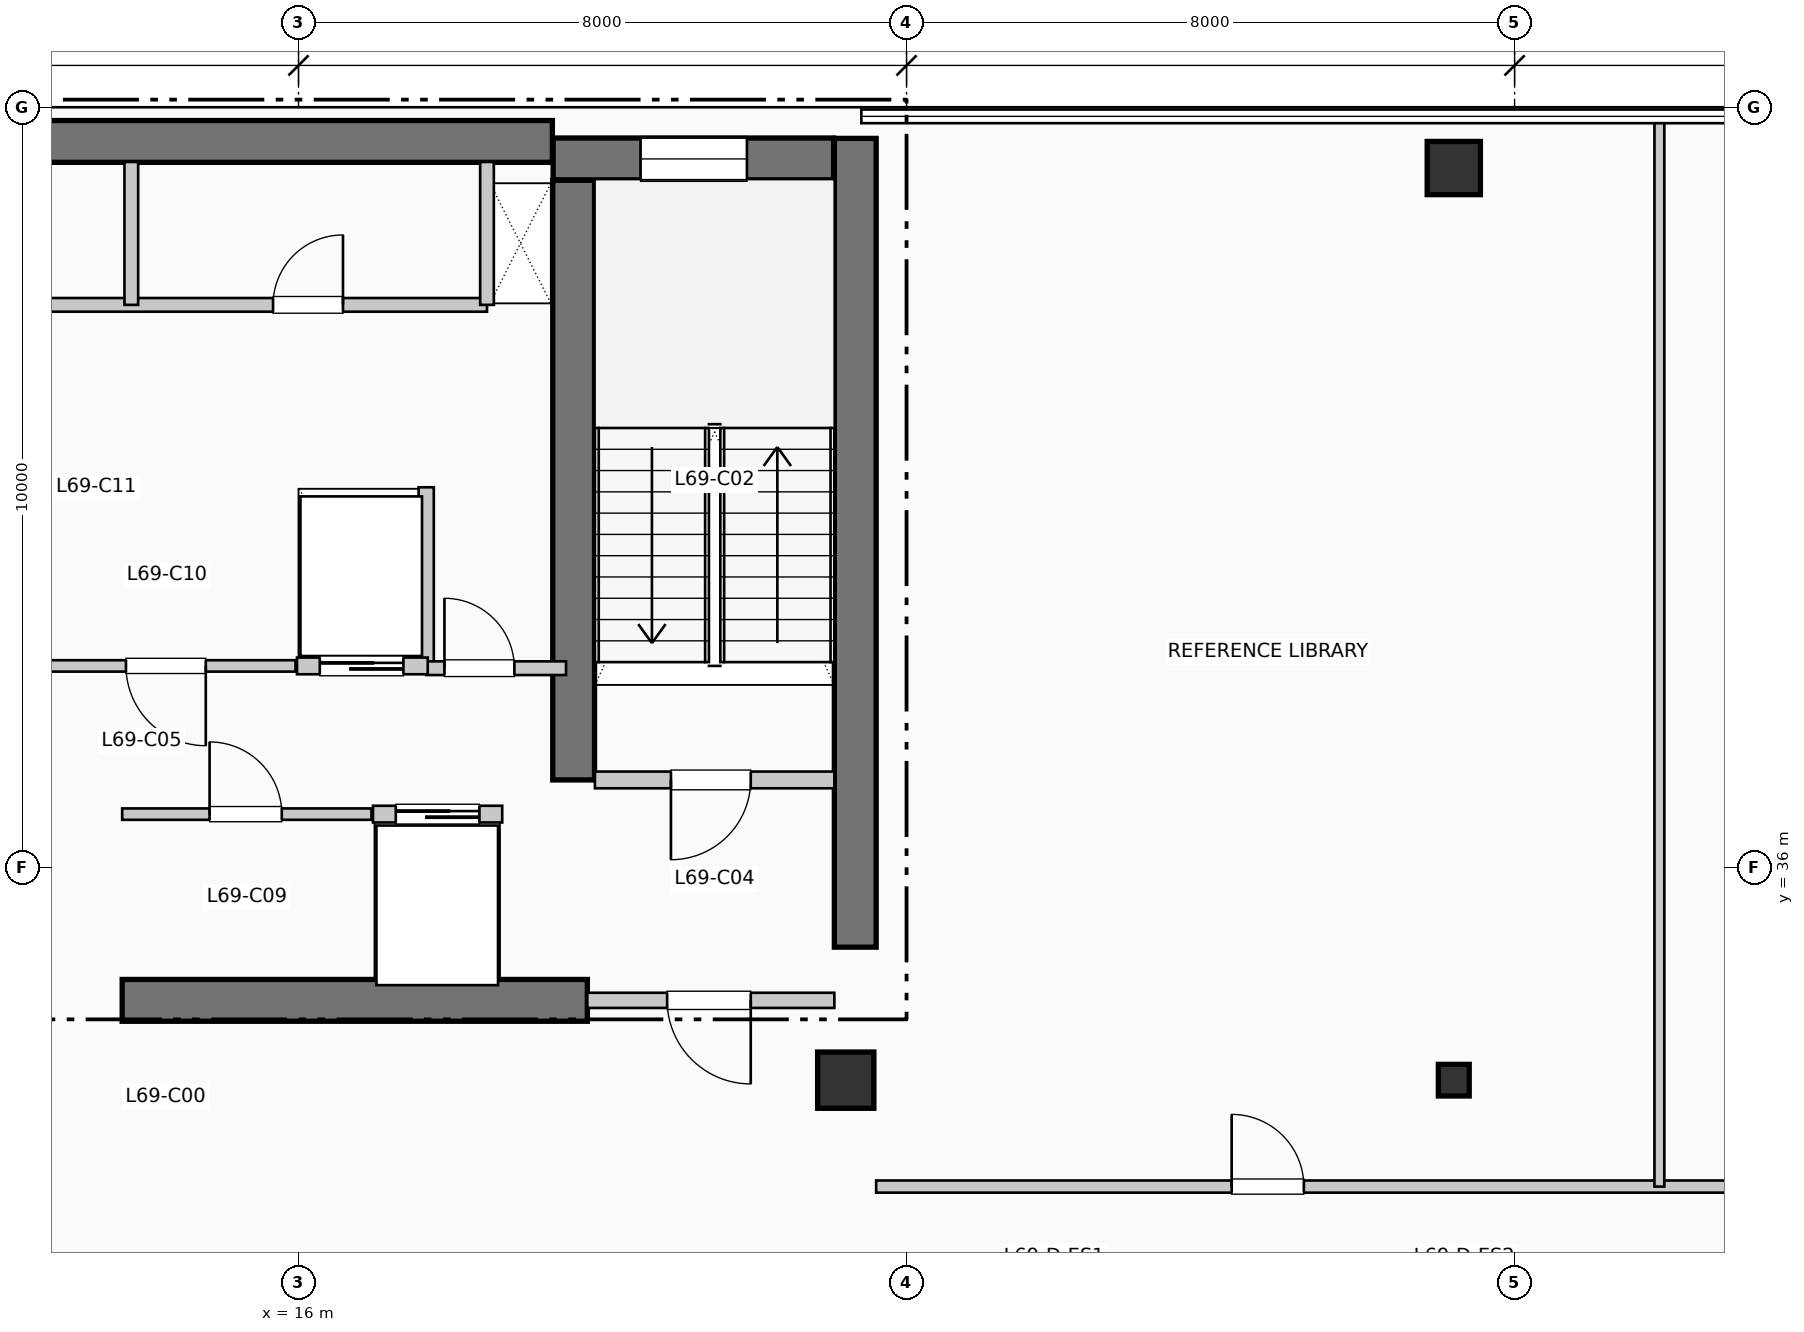
"""IFC4 building model, lengths in metres.
Left out: names, types, materials, properties, quantities, classifications, styles, units other than length and angle.
Written with IfcOpenShell. Run it as: python <this file> out.ifc"""

import sys

from ifc_helpers import new_model, si_unit, direction, frame, frame_2d, origin, origin_2d, place, context, subcontext, project, spatial, rectangle, i_section, extrude, element, fill, save


model = new_model("IFC4")
c1 = context("Model", 3, precision=1e-05, world=origin(), true_north=direction((0.0, 1.0)))
c2 = subcontext(c1, "Body", "Model", "MODEL_VIEW")
j1 = project(units=[si_unit("LENGTHUNIT", "METRE"), si_unit("PLANEANGLEUNIT", "RADIAN")], contexts=[c1])
p1 = place(None, origin())
s1 = spatial("IfcSite", under=j1, at=p1, CompositionType="ELEMENT")
p2 = place(p1, origin())
s2 = spatial("IfcBuilding", under=s1, at=p2, CompositionType="ELEMENT")
p3 = place(p2, frame((0.0, 0.0, 284.13)))
s3 = spatial("IfcBuildingStorey", under=s2, at=p3, CompositionType="ELEMENT", Elevation=284.13)
p4 = place(p3, frame((5.36, 45.55, 0.0), z_axis=(0.0, 0.0, 1.0), x_axis=(1.0, 0.0, 0.0)))
e1 = element("IfcWall", 1, at=p4, inside=s3, PredefinedType="SHEAR", context=c2, shape_type="SweptSolid", body=[
    extrude(rectangle(XDim=13.98, YDim=0.55, at=frame_2d((6.99, 0.0))), origin(), (0.0, 0.0, 1.0), 3.96),
])
p5 = place(p3, frame((23.325, 34.95, 0.0), z_axis=(0.0, 0.0, 1.0), x_axis=(0.0, 1.0, 0.0)))
e2 = element("IfcWall", 2, at=p5, inside=s3, PredefinedType="SHEAR", context=c2, shape_type="SweptSolid", body=[
    extrude(rectangle(XDim=10.64, YDim=0.55, at=frame_2d((5.32, 0.0))), origin(), (0.0, 0.0, 1.0), 3.96),
])
p6 = place(p3, frame((13.68, 34.25, 0.0), z_axis=(0.0, 0.0, 1.0), x_axis=(1.0, 0.0, 0.0)))
e3 = element("IfcWall", 3, at=p6, inside=s3, PredefinedType="SHEAR", context=c2, shape_type="SweptSolid", body=[
    extrude(rectangle(XDim=6.12, YDim=0.55, at=frame_2d((3.06, 0.0))), origin(), (0.0, 0.0, 1.0), 3.96),
])
p7 = place(p3, frame((19.62, 37.15, 0.0), z_axis=(0.0, 0.0, 1.0), x_axis=(0.0, 1.0, 0.0)))
e4 = element("IfcWall", 4, at=p7, inside=s3, PredefinedType="SHEAR", context=c2, shape_type="SweptSolid", body=[
    extrude(rectangle(XDim=7.89, YDim=0.55, at=frame_2d((3.945, 0.0))), origin(), (0.0, 0.0, 1.0), 3.96),
])
p8 = place(p3, frame((19.35, 45.32, 0.0), z_axis=(0.0, 0.0, 1.0), x_axis=(1.0, 0.0, 0.0)))
e5 = element("IfcWall", 5, at=p8, inside=s3, PredefinedType="SHEAR", context=c2, shape_type="SweptSolid", body=[
    extrude(rectangle(XDim=3.69, YDim=0.55, at=frame_2d((1.845, 0.0))), origin(), (0.0, 0.0, 1.0), 3.96),
])
p9 = place(p8, frame((1.15, 0.0, 1.05)))
e6 = element("IfcOpeningElement", 6, at=p9, cuts=e5, PredefinedType="OPENING", context=c2, shape_type="SweptSolid", body=[
    extrude(rectangle(XDim=1.4, YDim=1.8, at=frame_2d((0.7, 0.9))), frame((0.0, 0.285, 0.0), z_axis=(0.0, -1.0, 0.0), x_axis=(1.0, 0.0, 0.0)), (0.0, 0.0, 1.0), 0.57),
])
p10 = place(p3, frame((23.2, 33.2, 0.0), z_axis=(0.0, 0.0, 1.0), x_axis=(1.0, 0.0, 0.0)))
e7 = element("IfcColumn", 7, at=p10, inside=s3, PredefinedType="COLUMN", context=c2, shape_type="SweptSolid", body=[
    extrude(rectangle(XDim=0.74, YDim=0.74, at=origin_2d()), origin(), (0.0, 0.0, 1.0), 3.96),
])
p11 = place(p3, frame((31.2, 33.2, 0.0), z_axis=(0.0, 0.0, 1.0), x_axis=(1.0, 0.0, 0.0)))
e8 = element("IfcColumn", 8, at=p11, inside=s3, PredefinedType="COLUMN", context=c2, shape_type="SweptSolid", body=[
    extrude(i_section(OverallWidth=0.406, OverallDepth=0.416, WebThickness=0.022, FlangeThickness=0.036, at=origin_2d()), origin(), (0.0, 0.0, 1.0), 3.96),
])
p12 = place(p3, frame((31.2, 45.2, 0.0), z_axis=(0.0, 0.0, 1.0), x_axis=(1.0, 0.0, 0.0)))
e9 = element("IfcColumn", 9, at=p12, inside=s3, PredefinedType="COLUMN", context=c2, shape_type="SweptSolid", body=[
    extrude(rectangle(XDim=0.7, YDim=0.7, at=origin_2d()), origin(), (0.0, 0.0, 1.0), 3.96),
])
p13 = place(p3, frame((19.9, 37.15, 0.0), z_axis=(0.0, 0.0, 1.0), x_axis=(1.0, 0.0, 0.0)))
e10 = element("IfcWall", 10, at=p13, inside=s3, PredefinedType="PARTITIONING", context=c2, shape_type="SweptSolid", body=[
    extrude(rectangle(XDim=3.15, YDim=0.22, at=frame_2d((1.575, 0.0))), origin(), (0.0, 0.0, 1.0), 3.74),
])
p14 = place(p13, frame((2.05, 0.0, 0.0), z_axis=(0.0, 0.0, 1.0), x_axis=(-1.0, 0.0, 0.0)))
e11 = element("IfcOpeningElement", 11, at=p14, cuts=e10, PredefinedType="OPENING", context=c2, shape_type="SweptSolid", body=[
    extrude(rectangle(XDim=1.05, YDim=2.15, at=frame_2d((0.525, 1.075))), frame((0.0, 0.12, 0.0), z_axis=(0.0, -1.0, 0.0), x_axis=(1.0, 0.0, 0.0)), (0.0, 0.0, 1.0), 0.24),
])
p15 = place(p3, frame((19.8, 34.25, 0.0), z_axis=(0.0, 0.0, 1.0), x_axis=(1.0, 0.0, 0.0)))
e12 = element("IfcWall", 12, at=p15, inside=s3, PredefinedType="PARTITIONING", context=c2, shape_type="SweptSolid", body=[
    extrude(rectangle(XDim=3.25, YDim=0.2, at=frame_2d((1.625, 0.0))), origin(), (0.0, 0.0, 1.0), 3.74),
])
p16 = place(p15, frame((2.15, 0.0, 0.0), z_axis=(0.0, 0.0, 1.0), x_axis=(-1.0, 0.0, 0.0)))
e13 = element("IfcOpeningElement", 13, at=p16, cuts=e12, PredefinedType="OPENING", context=c2, shape_type="SweptSolid", body=[
    extrude(rectangle(XDim=1.1, YDim=2.15, at=frame_2d((0.55, 1.075))), frame((0.0, 0.11, 0.0), z_axis=(0.0, -1.0, 0.0), x_axis=(1.0, 0.0, 0.0)), (0.0, 0.0, 1.0), 0.22),
])
p17 = place(p3, frame((17.68, 38.65, 0.0), z_axis=(0.0, 0.0, 1.0), x_axis=(0.0, 1.0, 0.0)))
e14 = element("IfcWall", 14, at=p17, inside=s3, PredefinedType="PARTITIONING", context=c2, shape_type="SweptSolid", body=[
    extrude(rectangle(XDim=2.35, YDim=0.2, at=frame_2d((1.175, 0.0))), origin(), (0.0, 0.0, 1.0), 3.74),
])
p18 = place(p3, frame((17.68, 38.62, 0.0), z_axis=(0.0, 0.0, 1.0), x_axis=(1.0, 0.0, 0.0)))
e15 = element("IfcWall", 15, at=p18, inside=s3, PredefinedType="PARTITIONING", context=c2, shape_type="SweptSolid", body=[
    extrude(rectangle(XDim=1.84, YDim=0.18, at=frame_2d((0.92, 0.0))), origin(), (0.0, 0.0, 1.0), 3.74),
])
p19 = place(p18, frame((0.24, 0.0, 0.0)))
e16 = element("IfcOpeningElement", 16, at=p19, cuts=e15, PredefinedType="OPENING", context=c2, shape_type="SweptSolid", body=[
    extrude(rectangle(XDim=0.92, YDim=2.1, at=frame_2d((0.46, 1.05))), frame((0.0, 0.1, 0.0), z_axis=(0.0, -1.0, 0.0), x_axis=(1.0, 0.0, 0.0)), (0.0, 0.0, 1.0), 0.2),
])
p20 = place(p3, frame((13.68, 36.7, 0.0), z_axis=(0.0, 0.0, 1.0), x_axis=(1.0, 0.0, 0.0)))
e17 = element("IfcWall", 17, at=p20, inside=s3, PredefinedType="PARTITIONING", context=c2, shape_type="SweptSolid", body=[
    extrude(rectangle(XDim=3.28, YDim=0.15, at=frame_2d((1.64, 0.0))), origin(), (0.0, 0.0, 1.0), 3.74),
])
p21 = place(p20, frame((1.15, 0.0, 0.0)))
e18 = element("IfcOpeningElement", 18, at=p21, cuts=e17, PredefinedType="OPENING", context=c2, shape_type="SweptSolid", body=[
    extrude(rectangle(XDim=0.95, YDim=2.15, at=frame_2d((0.475, 1.075))), frame((0.0, 0.085, 0.0), z_axis=(0.0, -1.0, 0.0), x_axis=(1.0, 0.0, 0.0)), (0.0, 0.0, 1.0), 0.17),
])
p22 = place(p3, frame((12.58, 38.65, 0.0), z_axis=(0.0, 0.0, 1.0), x_axis=(1.0, 0.0, 0.0)))
e19 = element("IfcWall", 19, at=p22, inside=s3, PredefinedType="PARTITIONING", context=c2, shape_type="SweptSolid", body=[
    extrude(rectangle(XDim=3.38, YDim=0.15, at=frame_2d((1.69, 0.0))), origin(), (0.0, 0.0, 1.0), 3.74),
])
p23 = place(p22, frame((2.2, 0.0, 0.0), z_axis=(0.0, 0.0, 1.0), x_axis=(-1.0, 0.0, 0.0)))
e20 = element("IfcOpeningElement", 20, at=p23, cuts=e19, PredefinedType="OPENING", context=c2, shape_type="SweptSolid", body=[
    extrude(rectangle(XDim=1.05, YDim=2.15, at=frame_2d((0.525, 1.075))), frame((0.0, 0.085, 0.0), z_axis=(0.0, -1.0, 0.0), x_axis=(1.0, 0.0, 0.0)), (0.0, 0.0, 1.0), 0.17),
])
p24 = place(p3, frame((16.98, 36.7, 0.0), z_axis=(0.0, 0.0, 1.0), x_axis=(1.0, 0.0, 0.0)))
e21 = element("IfcWall", 21, at=p24, inside=s3, PredefinedType="PARTITIONING", context=c2, shape_type="SweptSolid", body=[
    extrude(rectangle(XDim=1.7, YDim=0.22, at=frame_2d((0.85, 0.0))), origin(), (0.0, 0.0, 1.0), 3.74),
])
p25 = place(p24, frame((0.3, 0.0, 0.0)))
e22 = element("IfcOpeningElement", 22, at=p25, cuts=e21, PredefinedType="OPENING", context=c2, shape_type="SweptSolid", body=[
    extrude(rectangle(XDim=1.1, YDim=2.2, at=frame_2d((0.55, 1.1))), frame((0.0, 0.12, 0.0), z_axis=(0.0, -1.0, 0.0), x_axis=(1.0, 0.0, 0.0)), (0.0, 0.0, 1.0), 0.24),
])
p26 = place(p3, frame((15.98, 38.65, 0.0), z_axis=(0.0, 0.0, 1.0), x_axis=(1.0, 0.0, 0.0)))
e23 = element("IfcWall", 23, at=p26, inside=s3, PredefinedType="PARTITIONING", context=c2, shape_type="SweptSolid", body=[
    extrude(rectangle(XDim=1.72, YDim=0.22, at=frame_2d((0.86, 0.0))), origin(), (0.0, 0.0, 1.0), 3.74),
])
p27 = place(p26, frame((0.3, 0.0, 0.0)))
e24 = element("IfcOpeningElement", 24, at=p27, cuts=e23, PredefinedType="OPENING", context=c2, shape_type="SweptSolid", body=[
    extrude(rectangle(XDim=1.1, YDim=2.2, at=frame_2d((0.55, 1.1))), frame((0.0, 0.12, 0.0), z_axis=(0.0, -1.0, 0.0), x_axis=(1.0, 0.0, 0.0)), (0.0, 0.0, 1.0), 0.24),
])
p28 = place(p3, frame((9.15, 43.4, 0.0), z_axis=(0.0, 0.0, 1.0), x_axis=(1.0, 0.0, 0.0)))
e25 = element("IfcWall", 25, at=p28, inside=s3, PredefinedType="PLUMBINGWALL", context=c2, shape_type="SweptSolid", body=[
    extrude(rectangle(XDim=9.33, YDim=0.18, at=frame_2d((4.665, 0.0))), origin(), (0.0, 0.0, 1.0), 3.74),
])
p29 = place(p28, frame((1.88, 0.0, 0.0)))
e26 = element("IfcOpeningElement", 26, at=p29, cuts=e25, PredefinedType="OPENING", context=c2, shape_type="SweptSolid", body=[
    extrude(rectangle(XDim=0.92, YDim=2.1, at=frame_2d((0.46, 1.05))), frame((0.0, 0.1, 0.0), z_axis=(0.0, -1.0, 0.0), x_axis=(1.0, 0.0, 0.0)), (0.0, 0.0, 1.0), 0.2),
])
p30 = place(p28, frame((6.515, 0.0, 0.0)))
e27 = element("IfcOpeningElement", 27, at=p30, cuts=e25, PredefinedType="OPENING", context=c2, shape_type="SweptSolid", body=[
    extrude(rectangle(XDim=0.92, YDim=2.1, at=frame_2d((0.46, 1.05))), frame((0.0, 0.1, 0.0), z_axis=(0.0, -1.0, 0.0), x_axis=(1.0, 0.0, 0.0)), (0.0, 0.0, 1.0), 0.2),
])
for number, where, z_axis, x_axis in (
    (28, (18.48, 43.4, 0.0), (0.0, 0.0, 1.0), (0.0, 1.0, 0.0)),
    (29, (13.8, 43.4, 0.0), (0.0, 0.0, 1.0), (0.0, 1.0, 0.0)),
):
    element("IfcWall", number, at=place(p3, frame(where, z_axis=z_axis, x_axis=x_axis)), inside=s3, PredefinedType="PLUMBINGWALL", context=c2, shape_type="SweptSolid", body=[
        extrude(rectangle(XDim=1.88, YDim=0.18, at=frame_2d((0.94, 0.0))), origin(), (0.0, 0.0, 1.0), 3.74),
    ])
p31 = place(p3, frame((23.6, 31.8, 0.0), z_axis=(0.0, 0.0, 1.0), x_axis=(1.0, 0.0, 0.0)))
e30 = element("IfcWall", 30, at=p31, inside=s3, PredefinedType="PARTITIONING", context=c2, shape_type="SweptSolid", body=[
    extrude(rectangle(XDim=20.61, YDim=0.16, at=frame_2d((10.305, 0.0))), origin(), (0.0, 0.0, 1.0), 3.74),
])
p32 = place(p31, frame((4.677, 0.0, 0.0)))
e31 = element("IfcOpeningElement", 31, at=p32, cuts=e30, PredefinedType="OPENING", context=c2, shape_type="SweptSolid", body=[
    extrude(rectangle(XDim=0.95, YDim=2.15, at=frame_2d((0.475, 1.075))), frame((0.0, 0.09, 0.0), z_axis=(0.0, -1.0, 0.0), x_axis=(1.0, 0.0, 0.0)), (0.0, 0.0, 1.0), 0.18),
])
p33 = place(p31, frame((14.982, 0.0, 0.0)))
e32 = element("IfcOpeningElement", 32, at=p33, cuts=e30, PredefinedType="OPENING", context=c2, shape_type="SweptSolid", body=[
    extrude(rectangle(XDim=0.95, YDim=2.15, at=frame_2d((0.475, 1.075))), frame((0.0, 0.09, 0.0), z_axis=(0.0, -1.0, 0.0), x_axis=(1.0, 0.0, 0.0)), (0.0, 0.0, 1.0), 0.18),
])
p34 = place(p3, frame((33.905, 31.8, 0.0), z_axis=(0.0, 0.0, 1.0), x_axis=(0.0, 1.0, 0.0)))
e33 = element("IfcWall", 33, at=p34, inside=s3, PredefinedType="PARTITIONING", context=c2, shape_type="SweptSolid", body=[
    extrude(rectangle(XDim=14.01, YDim=0.13, at=frame_2d((7.005, 0.0))), origin(), (0.0, 0.0, 1.0), 3.74),
])
p35 = place(p9, origin())
e34 = element("IfcWindow", 34, at=p35, inside=s3, PartitioningType="SINGLE_PANEL", PredefinedType="WINDOW", context=c2, shape_type="SweptSolid", body=[
    extrude(rectangle(XDim=1.4, YDim=1.8, at=frame_2d((0.7, 0.9))), frame((0.0, 0.03, 0.0), z_axis=(0.0, -1.0, 0.0), x_axis=(1.0, 0.0, 0.0)), (0.0, 0.0, 1.0), 0.06),
])
fill(e6, e34)
p36 = place(p14, origin())
e35 = element("IfcDoor", 35, at=p36, inside=s3, OperationType="SINGLE_SWING_LEFT", PredefinedType="DOOR", context=c2, shape_type="SweptSolid", body=[
    extrude(rectangle(XDim=1.05, YDim=2.15, at=frame_2d((0.525, 1.075))), frame((0.0, 0.025, 0.0), z_axis=(0.0, -1.0, 0.0), x_axis=(1.0, 0.0, 0.0)), (0.0, 0.0, 1.0), 0.05),
])
fill(e11, e35)
p37 = place(p16, origin())
e36 = element("IfcDoor", 36, at=p37, inside=s3, OperationType="SINGLE_SWING_RIGHT", PredefinedType="DOOR", context=c2, shape_type="SweptSolid", body=[
    extrude(rectangle(XDim=1.1, YDim=2.15, at=frame_2d((0.55, 1.075))), frame((0.0, 0.025, 0.0), z_axis=(0.0, -1.0, 0.0), x_axis=(1.0, 0.0, 0.0)), (0.0, 0.0, 1.0), 0.05),
])
fill(e13, e36)
p38 = place(p19, origin())
e37 = element("IfcDoor", 37, at=p38, inside=s3, OperationType="SINGLE_SWING_LEFT", PredefinedType="DOOR", context=c2, shape_type="SweptSolid", body=[
    extrude(rectangle(XDim=0.92, YDim=2.1, at=frame_2d((0.46, 1.05))), frame((0.0, 0.025, 0.0), z_axis=(0.0, -1.0, 0.0), x_axis=(1.0, 0.0, 0.0)), (0.0, 0.0, 1.0), 0.05),
])
fill(e16, e37)
p39 = place(p21, origin())
e38 = element("IfcDoor", 38, at=p39, inside=s3, OperationType="SINGLE_SWING_LEFT", PredefinedType="DOOR", context=c2, shape_type="SweptSolid", body=[
    extrude(rectangle(XDim=0.95, YDim=2.15, at=frame_2d((0.475, 1.075))), frame((0.0, 0.025, 0.0), z_axis=(0.0, -1.0, 0.0), x_axis=(1.0, 0.0, 0.0)), (0.0, 0.0, 1.0), 0.05),
])
fill(e18, e38)
p40 = place(p23, origin())
e39 = element("IfcDoor", 39, at=p40, inside=s3, OperationType="SINGLE_SWING_RIGHT", PredefinedType="DOOR", context=c2, shape_type="SweptSolid", body=[
    extrude(rectangle(XDim=1.05, YDim=2.15, at=frame_2d((0.525, 1.075))), frame((0.0, 0.025, 0.0), z_axis=(0.0, -1.0, 0.0), x_axis=(1.0, 0.0, 0.0)), (0.0, 0.0, 1.0), 0.05),
])
fill(e20, e39)
p41 = place(p25, origin())
e40 = element("IfcDoor", 40, at=p41, inside=s3, OperationType="SLIDING_TO_LEFT", PredefinedType="DOOR", context=c2, shape_type="SweptSolid", body=[
    extrude(rectangle(XDim=1.1, YDim=2.2, at=frame_2d((0.55, 1.1))), frame((0.0, 0.025, 0.0), z_axis=(0.0, -1.0, 0.0), x_axis=(1.0, 0.0, 0.0)), (0.0, 0.0, 1.0), 0.05),
])
fill(e22, e40)
p42 = place(p27, origin())
e41 = element("IfcDoor", 41, at=p42, inside=s3, OperationType="SLIDING_TO_LEFT", PredefinedType="DOOR", context=c2, shape_type="SweptSolid", body=[
    extrude(rectangle(XDim=1.1, YDim=2.2, at=frame_2d((0.55, 1.1))), frame((0.0, 0.025, 0.0), z_axis=(0.0, -1.0, 0.0), x_axis=(1.0, 0.0, 0.0)), (0.0, 0.0, 1.0), 0.05),
])
fill(e24, e41)
p43 = place(p30, origin())
e42 = element("IfcDoor", 42, at=p43, inside=s3, OperationType="SINGLE_SWING_RIGHT", PredefinedType="DOOR", context=c2, shape_type="SweptSolid", body=[
    extrude(rectangle(XDim=0.92, YDim=2.1, at=frame_2d((0.46, 1.05))), frame((0.0, 0.025, 0.0), z_axis=(0.0, -1.0, 0.0), x_axis=(1.0, 0.0, 0.0)), (0.0, 0.0, 1.0), 0.05),
])
fill(e27, e42)
p44 = place(p32, origin())
e43 = element("IfcDoor", 43, at=p44, inside=s3, OperationType="SINGLE_SWING_LEFT", PredefinedType="DOOR", context=c2, shape_type="SweptSolid", body=[
    extrude(rectangle(XDim=0.95, YDim=2.15, at=frame_2d((0.475, 1.075))), frame((0.0, 0.025, 0.0), z_axis=(0.0, -1.0, 0.0), x_axis=(1.0, 0.0, 0.0)), (0.0, 0.0, 1.0), 0.05),
])
fill(e31, e43)
save(model, sys.argv[1])
